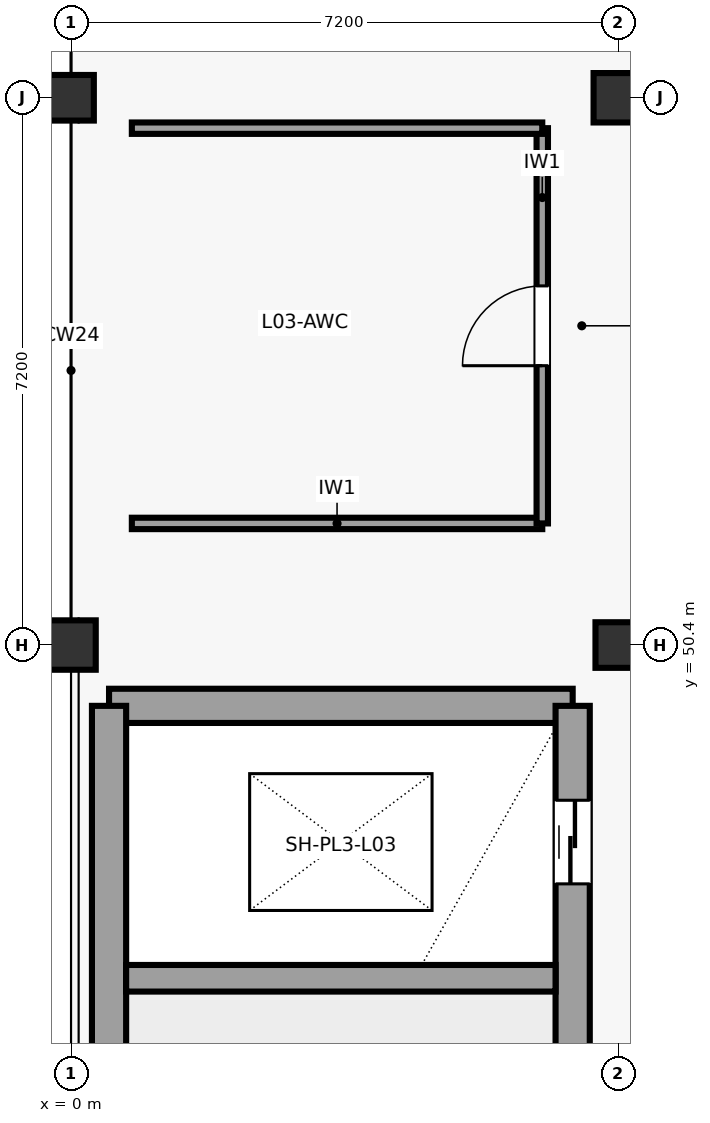
"""IFC4 building model, lengths in metres.
Left out: names, types, materials, properties, quantities, classifications, styles, units other than length and angle.
Written with IfcOpenShell. Run it as: python <this file> out.ifc"""

import sys

from ifc_helpers import new_model, si_unit, direction, frame, frame_2d, origin, origin_2d, place, context, subcontext, project, spatial, rectangle, extrude, element, fill, save


model = new_model("IFC4")
c1 = context("Model", 3, precision=1e-05, world=origin(), true_north=direction((0.0, 1.0)))
c2 = subcontext(c1, "Body", "Model", "MODEL_VIEW")
j1 = project(units=[si_unit("LENGTHUNIT", "METRE"), si_unit("PLANEANGLEUNIT", "RADIAN")], contexts=[c1])
p1 = place(None, origin())
s1 = spatial("IfcSite", under=j1, at=p1, CompositionType="ELEMENT")
p2 = place(p1, origin())
s2 = spatial("IfcBuilding", under=s1, at=p2, CompositionType="ELEMENT")
p3 = place(p2, frame((0.0, 0.0, 13.8)))
s3 = spatial("IfcBuildingStorey", under=s2, at=p3, CompositionType="ELEMENT", Elevation=13.8)
p4 = place(p3, frame((0.0, 50.4, 0.0), z_axis=(0.0, 0.0, 1.0), x_axis=(1.0, 0.0, 0.0)))
e1 = element("IfcColumn", 1, at=p4, inside=s3, PredefinedType="COLUMN", context=c2, shape_type="SweptSolid", body=[
    extrude(rectangle(XDim=0.65, YDim=0.65, at=origin_2d()), origin(), (0.0, 0.0, 1.0), 4.8),
])
for number, where, z_axis, x_axis in (
    (2, (0.0, 57.6, 0.0), (0.0, 0.0, 1.0), (1.0, 0.0, 0.0)),
    (3, (7.2, 50.4, 0.0), (0.0, 0.0, 1.0), (1.0, 0.0, 0.0)),
):
    element("IfcColumn", number, at=place(p3, frame(where, z_axis=z_axis, x_axis=x_axis)), inside=s3, PredefinedType="COLUMN", context=c2, shape_type="SweptSolid", body=[
        extrude(rectangle(XDim=0.6, YDim=0.6, at=origin_2d()), origin(), (0.0, 0.0, 1.0), 4.8),
    ])
p5 = place(p3, frame((7.2, 57.6, 0.0), z_axis=(0.0, 0.0, 1.0), x_axis=(1.0, 0.0, 0.0)))
e4 = element("IfcColumn", 4, at=p5, inside=s3, PredefinedType="COLUMN", context=c2, shape_type="SweptSolid", body=[
    extrude(rectangle(XDim=0.65, YDim=0.65, at=origin_2d()), origin(), (0.0, 0.0, 1.0), 4.8),
])
p6 = place(p3, frame((0.5, 49.6, 0.0), z_axis=(0.0, 0.0, 1.0), x_axis=(1.0, 0.0, 0.0)))
e5 = element("IfcWall", 5, at=p6, inside=s3, PredefinedType="SHEAR", context=c2, shape_type="SweptSolid", body=[
    extrude(rectangle(XDim=6.1, YDim=0.45, at=frame_2d((3.05, 0.0))), origin(), (0.0, 0.0, 1.0), 4.53),
])
p7 = place(p3, frame((0.5, 36.8, 0.0), z_axis=(0.0, 0.0, 1.0), x_axis=(0.0, 1.0, 0.0)))
e6 = element("IfcWall", 6, at=p7, inside=s3, PredefinedType="SHEAR", context=c2, shape_type="SweptSolid", body=[
    extrude(rectangle(XDim=12.8, YDim=0.45, at=frame_2d((6.4, 0.0))), origin(), (0.0, 0.0, 1.0), 4.53),
])
p8 = place(p3, frame((6.6, 36.8, 0.0), z_axis=(0.0, 0.0, 1.0), x_axis=(0.0, 1.0, 0.0)))
e7 = element("IfcWall", 7, at=p8, inside=s3, PredefinedType="SHEAR", context=c2, shape_type="SweptSolid", body=[
    extrude(rectangle(XDim=12.8, YDim=0.45, at=frame_2d((6.4, 0.0))), origin(), (0.0, 0.0, 1.0), 4.53),
])
p9 = place(p8, frame((0.55, 0.0, 0.0)))
e8 = element("IfcOpeningElement", 8, at=p9, cuts=e7, PredefinedType="OPENING", context=c2, shape_type="SweptSolid", body=[
    extrude(rectangle(XDim=1.2, YDim=2.25, at=frame_2d((0.6, 1.125))), frame((0.0, 0.235, 0.0), z_axis=(0.0, -1.0, 0.0), x_axis=(1.0, 0.0, 0.0)), (0.0, 0.0, 1.0), 0.47),
])
p10 = place(p8, frame((10.458, 0.0, 0.0)))
e9 = element("IfcOpeningElement", 9, at=p10, cuts=e7, PredefinedType="OPENING", context=c2, shape_type="SweptSolid", body=[
    extrude(rectangle(XDim=1.1, YDim=2.2, at=frame_2d((0.55, 1.1))), frame((0.0, 0.235, 0.0), z_axis=(0.0, -1.0, 0.0), x_axis=(1.0, 0.0, 0.0)), (0.0, 0.0, 1.0), 0.47),
])
p11 = place(p3, frame((0.725, 46.016, 0.0), z_axis=(0.0, 0.0, 1.0), x_axis=(1.0, 0.0, 0.0)))
e10 = element("IfcWall", 10, at=p11, inside=s3, PredefinedType="SHEAR", context=c2, shape_type="SweptSolid", body=[
    extrude(rectangle(XDim=5.65, YDim=0.35, at=frame_2d((2.825, 0.0))), origin(), (0.0, 0.0, 1.0), 4.53),
])
p12 = place(p3, frame((0.8, 52.0, 0.0), z_axis=(0.0, 0.0, 1.0), x_axis=(1.0, 0.0, 0.0)))
e11 = element("IfcWall", 11, at=p12, inside=s3, PredefinedType="PARTITIONING", context=c2, shape_type="SweptSolid", body=[
    extrude(rectangle(XDim=5.4, YDim=0.15, at=frame_2d((2.7, 0.0))), origin(), (0.0, 0.0, 1.0), 3.59),
])
p13 = place(p3, frame((6.2, 52.0, 0.0), z_axis=(0.0, 0.0, 1.0), x_axis=(0.0, 1.0, 0.0)))
e12 = element("IfcWall", 12, at=p13, inside=s3, PredefinedType="PARTITIONING", context=c2, shape_type="SweptSolid", body=[
    extrude(rectangle(XDim=5.2, YDim=0.15, at=frame_2d((2.6, 0.0))), origin(), (0.0, 0.0, 1.0), 3.59),
])
p14 = place(p13, frame((2.075, 0.0, 0.0)))
e13 = element("IfcOpeningElement", 13, at=p14, cuts=e12, PredefinedType="OPENING", context=c2, shape_type="SweptSolid", body=[
    extrude(rectangle(XDim=1.05, YDim=2.2, at=frame_2d((0.525, 1.1))), frame((0.0, 0.085, 0.0), z_axis=(0.0, -1.0, 0.0), x_axis=(1.0, 0.0, 0.0)), (0.0, 0.0, 1.0), 0.17),
])
p15 = place(p3, frame((6.2, 57.2, 0.0), z_axis=(0.0, 0.0, 1.0), x_axis=(-1.0, 0.0, 0.0)))
e14 = element("IfcWall", 14, at=p15, inside=s3, PredefinedType="PARTITIONING", context=c2, shape_type="SweptSolid", body=[
    extrude(rectangle(XDim=5.4, YDim=0.15, at=frame_2d((2.7, 0.0))), origin(), (0.0, 0.0, 1.0), 3.59),
])
p16 = place(p10, origin())
e15 = element("IfcDoor", 15, at=p16, inside=s3, OperationType="SLIDING_TO_LEFT", PredefinedType="DOOR", context=c2, shape_type="SweptSolid", body=[
    extrude(rectangle(XDim=1.1, YDim=2.2, at=frame_2d((0.55, 1.1))), frame((0.0, 0.025, 0.0), z_axis=(0.0, -1.0, 0.0), x_axis=(1.0, 0.0, 0.0)), (0.0, 0.0, 1.0), 0.05),
])
fill(e9, e15)
p17 = place(p14, origin())
e16 = element("IfcDoor", 16, at=p17, inside=s3, OperationType="SINGLE_SWING_LEFT", PredefinedType="DOOR", context=c2, shape_type="SweptSolid", body=[
    extrude(rectangle(XDim=1.05, YDim=2.2, at=frame_2d((0.525, 1.1))), frame((0.0, 0.025, 0.0), z_axis=(0.0, -1.0, 0.0), x_axis=(1.0, 0.0, 0.0)), (0.0, 0.0, 1.0), 0.05),
])
fill(e13, e16)
save(model, sys.argv[1])
